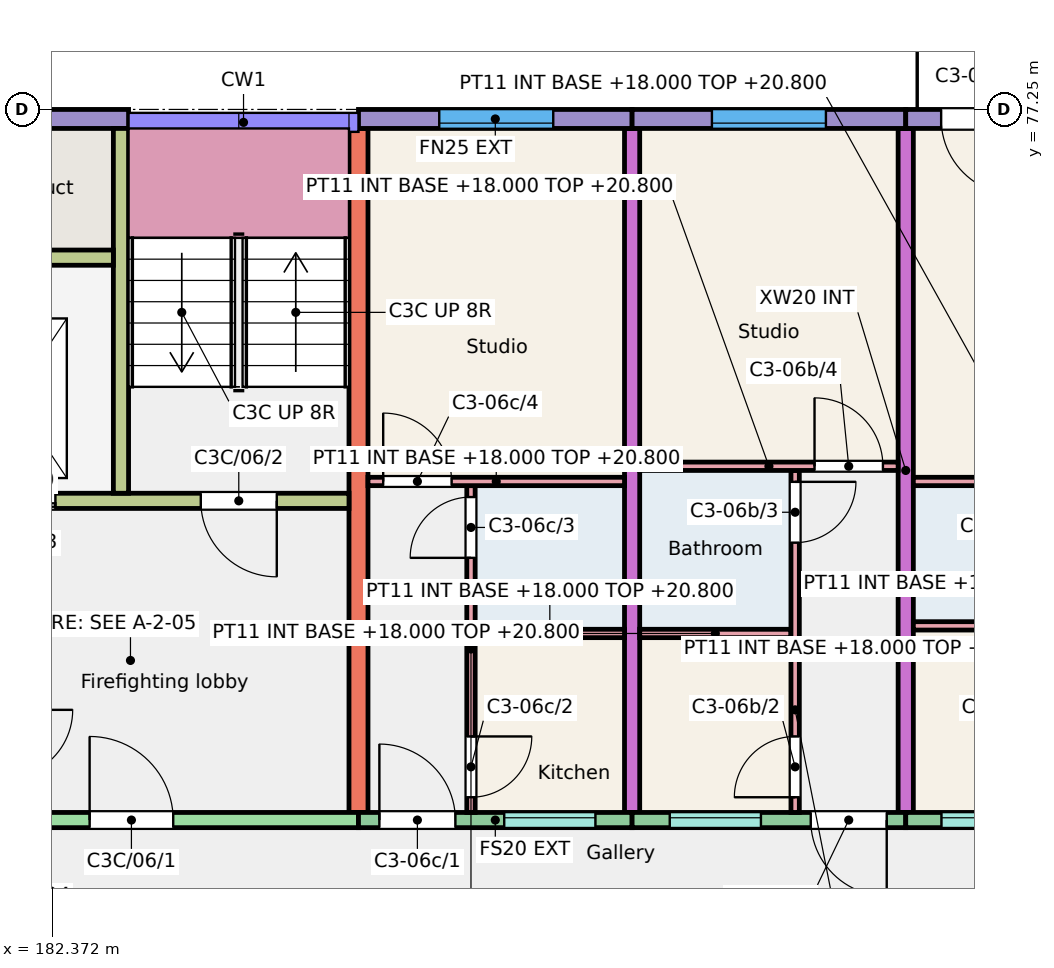
"""IFC4 building model, lengths in metres.
Left out: names, types, materials, properties, quantities, classifications, styles, units other than length and angle.
Written with IfcOpenShell. Run it as: python <this file> out.ifc"""

import sys

from ifc_helpers import new_model, si_unit, direction, frame, frame_2d, origin, place, context, subcontext, project, spatial, rectangle, extrude, element, fill, save


model = new_model("IFC4")
c1 = context("Model", 3, precision=1e-05, world=origin(), true_north=direction((0.0, 1.0)))
c2 = subcontext(c1, "Body", "Model", "MODEL_VIEW")
j1 = project(units=[si_unit("LENGTHUNIT", "METRE"), si_unit("PLANEANGLEUNIT", "RADIAN")], contexts=[c1])
p1 = place(None, origin())
s1 = spatial("IfcSite", under=j1, at=p1, CompositionType="ELEMENT")
p2 = place(p1, origin())
s2 = spatial("IfcBuilding", under=s1, at=p2, CompositionType="ELEMENT")
p3 = place(p2, frame((0.0, 0.0, 18.0)))
s3 = spatial("IfcBuildingStorey", under=s2, at=p3, CompositionType="ELEMENT", Elevation=18.0)
p4 = place(p3, frame((186.4, 68.0, 0.0), z_axis=(0.0, 0.0, 1.0), x_axis=(0.0, 1.0, 0.0)))
e1 = element("IfcWall", 1, at=p4, inside=s3, PredefinedType="SHEAR", context=c2, shape_type="SweptSolid", body=[
    extrude(rectangle(XDim=9.0, YDim=0.25, at=frame_2d((4.5, 0.0))), origin(), (0.0, 0.0, 1.0), 3.0),
])
for number, where, z_axis, x_axis in (
    (2, (190.0, 68.0, 0.0), (0.0, 0.0, 1.0), (0.0, 1.0, 0.0)),
    (3, (193.6, 68.0, 0.0), (0.0, 0.0, 1.0), (0.0, 1.0, 0.0)),
):
    element("IfcWall", number, at=place(p3, frame(where, z_axis=z_axis, x_axis=x_axis)), inside=s3, PredefinedType="SHEAR", context=c2, shape_type="SweptSolid", body=[
        extrude(rectangle(XDim=9.0, YDim=0.2, at=frame_2d((4.5, 0.0))), origin(), (0.0, 0.0, 1.0), 3.0),
    ])
p5 = place(p3, frame((180.4, 77.125, 0.0), z_axis=(0.0, 0.0, 1.0), x_axis=(1.0, 0.0, 0.0)))
e4 = element("IfcWall", 4, at=p5, inside=s3, PredefinedType="SOLIDWALL", context=c2, shape_type="SweptSolid", body=[
    extrude(rectangle(XDim=2.975, YDim=0.25, at=frame_2d((1.488, 0.0))), origin(), (0.0, 0.0, 1.0), 3.0),
])
p6 = place(p3, frame((180.55, 67.9, 0.0), z_axis=(0.0, 0.0, 1.0), x_axis=(1.0, 0.0, 0.0)))
e5 = element("IfcWall", 5, at=p6, inside=s3, PredefinedType="SHEAR", context=c2, shape_type="SweptSolid", body=[
    extrude(rectangle(XDim=5.85, YDim=0.2, at=frame_2d((2.925, 0.0))), origin(), (0.0, 0.0, 1.0), 3.0),
])
p7 = place(p6, frame((2.312, 0.0, 0.0)))
e6 = element("IfcOpeningElement", 6, at=p7, cuts=e5, PredefinedType="OPENING", context=c2, shape_type="SweptSolid", body=[
    extrude(rectangle(XDim=1.1, YDim=2.1, at=frame_2d((0.55, 1.05))), frame((0.0, 0.11, 0.0), z_axis=(0.0, -1.0, 0.0), x_axis=(1.0, 0.0, 0.0)), (0.0, 0.0, 1.0), 0.22),
])
p8 = place(p3, frame((180.55, 72.1, 0.0), z_axis=(0.0, 0.0, 1.0), x_axis=(1.0, 0.0, 0.0)))
e7 = element("IfcWall", 7, at=p8, inside=s3, PredefinedType="SHEAR", context=c2, shape_type="SweptSolid", body=[
    extrude(rectangle(XDim=5.725, YDim=0.2, at=frame_2d((2.862, 0.0))), origin(), (0.0, 0.0, 1.0), 3.0),
])
p9 = place(p8, frame((3.775, 0.0, 0.0)))
e8 = element("IfcOpeningElement", 8, at=p9, cuts=e7, PredefinedType="OPENING", context=c2, shape_type="SweptSolid", body=[
    extrude(rectangle(XDim=1.0, YDim=2.1, at=frame_2d((0.5, 1.05))), frame((0.0, 0.11, 0.0), z_axis=(0.0, -1.0, 0.0), x_axis=(1.0, 0.0, 0.0)), (0.0, 0.0, 1.0), 0.22),
])
p10 = place(p8, frame((0.762, 0.0, 0.0)))
e9 = element("IfcOpeningElement", 9, at=p10, cuts=e7, PredefinedType="OPENING", context=c2, shape_type="SweptSolid", body=[
    extrude(rectangle(XDim=1.1, YDim=2.1, at=frame_2d((0.55, 1.05))), frame((0.0, 0.11, 0.0), z_axis=(0.0, -1.0, 0.0), x_axis=(1.0, 0.0, 0.0)), (0.0, 0.0, 1.0), 0.22),
])
p11 = place(p3, frame((183.275, 72.2, 0.0), z_axis=(0.0, 0.0, 1.0), x_axis=(0.0, 1.0, 0.0)))
e10 = element("IfcWall", 10, at=p11, inside=s3, PredefinedType="SHEAR", context=c2, shape_type="SweptSolid", body=[
    extrude(rectangle(XDim=4.8, YDim=0.2, at=frame_2d((2.4, 0.0))), origin(), (0.0, 0.0, 1.0), 3.0),
])
p12 = place(p3, frame((180.55, 75.3, 0.0), z_axis=(0.0, 0.0, 1.0), x_axis=(1.0, 0.0, 0.0)))
e11 = element("IfcWall", 11, at=p12, inside=s3, PredefinedType="SHEAR", context=c2, shape_type="SweptSolid", body=[
    extrude(rectangle(XDim=2.625, YDim=0.2, at=frame_2d((1.312, 0.0))), origin(), (0.0, 0.0, 1.0), 3.0),
])
p13 = place(p3, frame((186.4, 77.125, 0.0), z_axis=(0.0, 0.0, 1.0), x_axis=(1.0, 0.0, 0.0)))
e12 = element("IfcWall", 12, at=p13, inside=s3, PredefinedType="SOLIDWALL", context=c2, shape_type="SweptSolid", body=[
    extrude(rectangle(XDim=3.6, YDim=0.25, at=frame_2d((1.8, 0.0))), origin(), (0.0, 0.0, 1.0), 3.0),
])
p14 = place(p13, frame((1.062, 0.0, 0.9)))
e13 = element("IfcOpeningElement", 13, at=p14, cuts=e12, PredefinedType="OPENING", context=c2, shape_type="SweptSolid", body=[
    extrude(rectangle(XDim=1.5, YDim=1.5, at=frame_2d((0.75, 0.75))), frame((0.0, 0.135, 0.0), z_axis=(0.0, -1.0, 0.0), x_axis=(1.0, 0.0, 0.0)), (0.0, 0.0, 1.0), 0.27),
])
p15 = place(p3, frame((186.4, 67.9, 0.0), z_axis=(0.0, 0.0, 1.0), x_axis=(1.0, 0.0, 0.0)))
e14 = element("IfcWall", 14, at=p15, inside=s3, PredefinedType="SOLIDWALL", context=c2, shape_type="SweptSolid", body=[
    extrude(rectangle(XDim=3.6, YDim=0.2, at=frame_2d((1.8, 0.0))), origin(), (0.0, 0.0, 1.0), 3.0),
])
p16 = place(p15, frame((1.917, 0.0, 1.1)))
e15 = element("IfcOpeningElement", 15, at=p16, cuts=e14, PredefinedType="OPENING", context=c2, shape_type="SweptSolid", body=[
    extrude(rectangle(XDim=1.2, YDim=1.3, at=frame_2d((0.6, 0.65))), frame((0.0, 0.11, 0.0), z_axis=(0.0, -1.0, 0.0), x_axis=(1.0, 0.0, 0.0)), (0.0, 0.0, 1.0), 0.22),
])
p17 = place(p15, frame((0.275, 0.0, 0.0)))
e16 = element("IfcOpeningElement", 16, at=p17, cuts=e14, PredefinedType="OPENING", context=c2, shape_type="SweptSolid", body=[
    extrude(rectangle(XDim=1.0, YDim=2.1, at=frame_2d((0.5, 1.05))), frame((0.0, 0.11, 0.0), z_axis=(0.0, -1.0, 0.0), x_axis=(1.0, 0.0, 0.0)), (0.0, 0.0, 1.0), 0.22),
])
p18 = place(p3, frame((190.0, 77.125, 0.0), z_axis=(0.0, 0.0, 1.0), x_axis=(1.0, 0.0, 0.0)))
e17 = element("IfcWall", 17, at=p18, inside=s3, PredefinedType="SOLIDWALL", context=c2, shape_type="SweptSolid", body=[
    extrude(rectangle(XDim=3.6, YDim=0.25, at=frame_2d((1.8, 0.0))), origin(), (0.0, 0.0, 1.0), 3.0),
])
p19 = place(p18, frame((1.05, 0.0, 0.9)))
e18 = element("IfcOpeningElement", 18, at=p19, cuts=e17, PredefinedType="OPENING", context=c2, shape_type="SweptSolid", body=[
    extrude(rectangle(XDim=1.5, YDim=1.5, at=frame_2d((0.75, 0.75))), frame((0.0, 0.135, 0.0), z_axis=(0.0, -1.0, 0.0), x_axis=(1.0, 0.0, 0.0)), (0.0, 0.0, 1.0), 0.27),
])
p20 = place(p3, frame((190.0, 67.9, 0.0), z_axis=(0.0, 0.0, 1.0), x_axis=(1.0, 0.0, 0.0)))
e19 = element("IfcWall", 19, at=p20, inside=s3, PredefinedType="SOLIDWALL", context=c2, shape_type="SweptSolid", body=[
    extrude(rectangle(XDim=3.6, YDim=0.2, at=frame_2d((1.8, 0.0))), origin(), (0.0, 0.0, 1.0), 3.0),
])
p21 = place(p20, frame((0.495, 0.0, 1.1)))
e20 = element("IfcOpeningElement", 20, at=p21, cuts=e19, PredefinedType="OPENING", context=c2, shape_type="SweptSolid", body=[
    extrude(rectangle(XDim=1.2, YDim=1.3, at=frame_2d((0.6, 0.65))), frame((0.0, 0.11, 0.0), z_axis=(0.0, -1.0, 0.0), x_axis=(1.0, 0.0, 0.0)), (0.0, 0.0, 1.0), 0.22),
])
p22 = place(p20, frame((2.35, 0.0, 0.0)))
e21 = element("IfcOpeningElement", 21, at=p22, cuts=e19, PredefinedType="OPENING", context=c2, shape_type="SweptSolid", body=[
    extrude(rectangle(XDim=1.0, YDim=2.1, at=frame_2d((0.5, 1.05))), frame((0.0, 0.11, 0.0), z_axis=(0.0, -1.0, 0.0), x_axis=(1.0, 0.0, 0.0)), (0.0, 0.0, 1.0), 0.22),
])
p23 = place(p3, frame((193.6, 77.125, 0.0), z_axis=(0.0, 0.0, 1.0), x_axis=(1.0, 0.0, 0.0)))
e22 = element("IfcWall", 22, at=p23, inside=s3, PredefinedType="SOLIDWALL", context=c2, shape_type="SweptSolid", body=[
    extrude(rectangle(XDim=3.6, YDim=0.25, at=frame_2d((1.8, 0.0))), origin(), (0.0, 0.0, 1.0), 3.0),
])
p24 = place(p23, frame((1.758, 0.0, 0.9)))
e23 = element("IfcOpeningElement", 23, at=p24, cuts=e22, PredefinedType="OPENING", context=c2, shape_type="SweptSolid", body=[
    extrude(rectangle(XDim=1.5, YDim=1.5, at=frame_2d((0.75, 0.75))), frame((0.0, 0.135, 0.0), z_axis=(0.0, -1.0, 0.0), x_axis=(1.0, 0.0, 0.0)), (0.0, 0.0, 1.0), 0.27),
])
p25 = place(p23, frame((0.466, 0.0, 0.0)))
e24 = element("IfcOpeningElement", 24, at=p25, cuts=e22, PredefinedType="OPENING", context=c2, shape_type="SweptSolid", body=[
    extrude(rectangle(XDim=1.0, YDim=2.1, at=frame_2d((0.5, 1.05))), frame((0.0, 0.135, 0.0), z_axis=(0.0, -1.0, 0.0), x_axis=(1.0, 0.0, 0.0)), (0.0, 0.0, 1.0), 0.27),
])
p26 = place(p3, frame((193.6, 67.9, 0.0), z_axis=(0.0, 0.0, 1.0), x_axis=(1.0, 0.0, 0.0)))
e25 = element("IfcWall", 25, at=p26, inside=s3, PredefinedType="SOLIDWALL", context=c2, shape_type="SweptSolid", body=[
    extrude(rectangle(XDim=3.45, YDim=0.2, at=frame_2d((1.725, 0.0))), origin(), (0.0, 0.0, 1.0), 3.0),
])
p27 = place(p26, frame((0.47, 0.0, 1.1)))
e26 = element("IfcOpeningElement", 26, at=p27, cuts=e25, PredefinedType="OPENING", context=c2, shape_type="SweptSolid", body=[
    extrude(rectangle(XDim=1.2, YDim=1.3, at=frame_2d((0.6, 0.65))), frame((0.0, 0.11, 0.0), z_axis=(0.0, -1.0, 0.0), x_axis=(1.0, 0.0, 0.0)), (0.0, 0.0, 1.0), 0.22),
])
p28 = place(p26, frame((2.3, 0.0, 0.0)))
e27 = element("IfcOpeningElement", 27, at=p28, cuts=e25, PredefinedType="OPENING", context=c2, shape_type="SweptSolid", body=[
    extrude(rectangle(XDim=1.0, YDim=2.1, at=frame_2d((0.5, 1.05))), frame((0.0, 0.11, 0.0), z_axis=(0.0, -1.0, 0.0), x_axis=(1.0, 0.0, 0.0)), (0.0, 0.0, 1.0), 0.22),
])
p29 = place(p3, frame((193.7, 70.455, 0.0), z_axis=(0.0, 0.0, 1.0), x_axis=(1.0, 0.0, 0.0)))
e28 = element("IfcWall", 28, at=p29, inside=s3, PredefinedType="PARTITIONING", context=c2, shape_type="SweptSolid", body=[
    extrude(rectangle(XDim=1.94, YDim=0.11, at=frame_2d((0.97, 0.0))), origin(), (0.0, 0.0, 1.0), 2.8),
])
p30 = place(p3, frame((193.7, 72.355, 0.0), z_axis=(0.0, 0.0, 1.0), x_axis=(1.0, 0.0, 0.0)))
e29 = element("IfcWall", 29, at=p30, inside=s3, PredefinedType="PARTITIONING", context=c2, shape_type="SweptSolid", body=[
    extrude(rectangle(XDim=3.35, YDim=0.11, at=frame_2d((1.675, 0.0))), origin(), (0.0, 0.0, 1.0), 2.8),
])
p31 = place(p30, frame((2.25, 0.0, 0.0)))
e30 = element("IfcOpeningElement", 30, at=p31, cuts=e29, PredefinedType="OPENING", context=c2, shape_type="SweptSolid", body=[
    extrude(rectangle(XDim=0.9, YDim=2.1, at=frame_2d((0.45, 1.05))), frame((0.0, 0.065, 0.0), z_axis=(0.0, -1.0, 0.0), x_axis=(1.0, 0.0, 0.0)), (0.0, 0.0, 1.0), 0.13),
])
p32 = place(p3, frame((190.1, 70.355, 0.0), z_axis=(0.0, 0.0, 1.0), x_axis=(1.0, 0.0, 0.0)))
e31 = element("IfcWall", 31, at=p32, inside=s3, PredefinedType="PARTITIONING", context=c2, shape_type="SweptSolid", body=[
    extrude(rectangle(XDim=1.99, YDim=0.11, at=frame_2d((0.995, 0.0))), origin(), (0.0, 0.0, 1.0), 2.8),
])
p33 = place(p3, frame((192.145, 68.0, 0.0), z_axis=(0.0, 0.0, 1.0), x_axis=(0.0, 1.0, 0.0)))
e32 = element("IfcWall", 32, at=p33, inside=s3, PredefinedType="PARTITIONING", context=c2, shape_type="SweptSolid", body=[
    extrude(rectangle(XDim=4.5, YDim=0.11, at=frame_2d((2.25, 0.0))), origin(), (0.0, 0.0, 1.0), 2.8),
])
p34 = place(p33, frame((0.2, 0.0, 0.0)))
e33 = element("IfcOpeningElement", 33, at=p34, cuts=e32, PredefinedType="OPENING", context=c2, shape_type="SweptSolid", body=[
    extrude(rectangle(XDim=0.8, YDim=2.1, at=frame_2d((0.4, 1.05))), frame((0.0, 0.065, 0.0), z_axis=(0.0, -1.0, 0.0), x_axis=(1.0, 0.0, 0.0)), (0.0, 0.0, 1.0), 0.13),
])
p35 = place(p33, frame((3.55, 0.0, 0.0)))
e34 = element("IfcOpeningElement", 34, at=p35, cuts=e32, PredefinedType="OPENING", context=c2, shape_type="SweptSolid", body=[
    extrude(rectangle(XDim=0.8, YDim=2.1, at=frame_2d((0.4, 1.05))), frame((0.0, 0.065, 0.0), z_axis=(0.0, -1.0, 0.0), x_axis=(1.0, 0.0, 0.0)), (0.0, 0.0, 1.0), 0.13),
])
p36 = place(p3, frame((190.1, 72.555, 0.0), z_axis=(0.0, 0.0, 1.0), x_axis=(1.0, 0.0, 0.0)))
e35 = element("IfcWall", 35, at=p36, inside=s3, PredefinedType="PARTITIONING", context=c2, shape_type="SweptSolid", body=[
    extrude(rectangle(XDim=3.4, YDim=0.11, at=frame_2d((1.7, 0.0))), origin(), (0.0, 0.0, 1.0), 2.8),
])
p37 = place(p36, frame((2.3, 0.0, 0.0)))
e36 = element("IfcOpeningElement", 36, at=p37, cuts=e35, PredefinedType="OPENING", context=c2, shape_type="SweptSolid", body=[
    extrude(rectangle(XDim=0.9, YDim=2.1, at=frame_2d((0.45, 1.05))), frame((0.0, 0.065, 0.0), z_axis=(0.0, -1.0, 0.0), x_axis=(1.0, 0.0, 0.0)), (0.0, 0.0, 1.0), 0.13),
])
p38 = place(p3, frame((187.88, 68.0, 0.0), z_axis=(0.0, 0.0, 1.0), x_axis=(0.0, 1.0, 0.0)))
e37 = element("IfcWall", 37, at=p38, inside=s3, PredefinedType="PARTITIONING", context=c2, shape_type="SweptSolid", body=[
    extrude(rectangle(XDim=4.3, YDim=0.11, at=frame_2d((2.15, 0.0))), origin(), (0.0, 0.0, 1.0), 2.8),
])
p39 = place(p38, frame((0.2, 0.0, 0.0)))
e38 = element("IfcOpeningElement", 38, at=p39, cuts=e37, PredefinedType="OPENING", context=c2, shape_type="SweptSolid", body=[
    extrude(rectangle(XDim=0.8, YDim=2.1, at=frame_2d((0.4, 1.05))), frame((0.0, 0.065, 0.0), z_axis=(0.0, -1.0, 0.0), x_axis=(1.0, 0.0, 0.0)), (0.0, 0.0, 1.0), 0.13),
])
p40 = place(p38, frame((3.35, 0.0, 0.0)))
e39 = element("IfcOpeningElement", 39, at=p40, cuts=e37, PredefinedType="OPENING", context=c2, shape_type="SweptSolid", body=[
    extrude(rectangle(XDim=0.8, YDim=2.1, at=frame_2d((0.4, 1.05))), frame((0.0, 0.065, 0.0), z_axis=(0.0, -1.0, 0.0), x_axis=(1.0, 0.0, 0.0)), (0.0, 0.0, 1.0), 0.13),
])
p41 = place(p3, frame((187.935, 70.355, 0.0), z_axis=(0.0, 0.0, 1.0), x_axis=(1.0, 0.0, 0.0)))
e40 = element("IfcWall", 40, at=p41, inside=s3, PredefinedType="PARTITIONING", context=c2, shape_type="SweptSolid", body=[
    extrude(rectangle(XDim=1.965, YDim=0.11, at=frame_2d((0.982, 0.0))), origin(), (0.0, 0.0, 1.0), 2.8),
])
p42 = place(p3, frame((186.525, 72.355, 0.0), z_axis=(0.0, 0.0, 1.0), x_axis=(1.0, 0.0, 0.0)))
e41 = element("IfcWall", 41, at=p42, inside=s3, PredefinedType="PARTITIONING", context=c2, shape_type="SweptSolid", body=[
    extrude(rectangle(XDim=3.375, YDim=0.11, at=frame_2d((1.688, 0.0))), origin(), (0.0, 0.0, 1.0), 2.8),
])
p43 = place(p42, frame((0.2, 0.0, 0.0)))
e42 = element("IfcOpeningElement", 42, at=p43, cuts=e41, PredefinedType="OPENING", context=c2, shape_type="SweptSolid", body=[
    extrude(rectangle(XDim=0.9, YDim=2.1, at=frame_2d((0.45, 1.05))), frame((0.0, 0.065, 0.0), z_axis=(0.0, -1.0, 0.0), x_axis=(1.0, 0.0, 0.0)), (0.0, 0.0, 1.0), 0.13),
])
p44 = place(p27, origin())
e43 = element("IfcWindow", 43, at=p44, inside=s3, PartitioningType="SINGLE_PANEL", PredefinedType="WINDOW", context=c2, shape_type="SweptSolid", body=[
    extrude(rectangle(XDim=1.2, YDim=1.3, at=frame_2d((0.6, 0.65))), frame((0.0, 0.06, 0.0), z_axis=(0.0, -1.0, 0.0), x_axis=(1.0, 0.0, 0.0)), (0.0, 0.0, 1.0), 0.06),
])
fill(e26, e43)
p45 = place(p21, origin())
e44 = element("IfcWindow", 44, at=p45, inside=s3, PartitioningType="SINGLE_PANEL", PredefinedType="WINDOW", context=c2, shape_type="SweptSolid", body=[
    extrude(rectangle(XDim=1.2, YDim=1.3, at=frame_2d((0.6, 0.65))), frame((0.0, 0.06, 0.0), z_axis=(0.0, -1.0, 0.0), x_axis=(1.0, 0.0, 0.0)), (0.0, 0.0, 1.0), 0.06),
])
fill(e20, e44)
p46 = place(p19, origin())
e45 = element("IfcWindow", 45, at=p46, inside=s3, PartitioningType="SINGLE_PANEL", PredefinedType="WINDOW", context=c2, shape_type="SweptSolid", body=[
    extrude(rectangle(XDim=1.5, YDim=1.5, at=frame_2d((0.75, 0.75))), frame((0.0, -0.025, 0.0), z_axis=(0.0, -1.0, 0.0), x_axis=(1.0, 0.0, 0.0)), (0.0, 0.0, 1.0), 0.06),
])
fill(e18, e45)
p47 = place(p16, origin())
e46 = element("IfcWindow", 46, at=p47, inside=s3, PartitioningType="SINGLE_PANEL", PredefinedType="WINDOW", context=c2, shape_type="SweptSolid", body=[
    extrude(rectangle(XDim=1.2, YDim=1.3, at=frame_2d((0.6, 0.65))), frame((0.0, 0.06, 0.0), z_axis=(0.0, -1.0, 0.0), x_axis=(1.0, 0.0, 0.0)), (0.0, 0.0, 1.0), 0.06),
])
fill(e15, e46)
p48 = place(p14, origin())
e47 = element("IfcWindow", 47, at=p48, inside=s3, PartitioningType="SINGLE_PANEL", PredefinedType="WINDOW", context=c2, shape_type="SweptSolid", body=[
    extrude(rectangle(XDim=1.5, YDim=1.5, at=frame_2d((0.75, 0.75))), frame((0.0, -0.025, 0.0), z_axis=(0.0, -1.0, 0.0), x_axis=(1.0, 0.0, 0.0)), (0.0, 0.0, 1.0), 0.06),
])
fill(e13, e47)
p49 = place(p25, origin())
e48 = element("IfcDoor", 48, at=p49, inside=s3, OperationType="SINGLE_SWING_RIGHT", PredefinedType="DOOR", context=c2, shape_type="SweptSolid", body=[
    extrude(rectangle(XDim=1.0, YDim=2.1, at=frame_2d((0.5, 1.05))), frame((0.0, 0.025, 0.0), z_axis=(0.0, -1.0, 0.0), x_axis=(1.0, 0.0, 0.0)), (0.0, 0.0, 1.0), 0.05),
])
fill(e24, e48)
p50 = place(p22, origin())
e49 = element("IfcDoor", 49, at=p50, inside=s3, OperationType="SINGLE_SWING_RIGHT", PredefinedType="DOOR", context=c2, shape_type="SweptSolid", body=[
    extrude(rectangle(XDim=1.0, YDim=2.1, at=frame_2d((0.5, 1.05))), frame((0.0, 0.025, 0.0), z_axis=(0.0, -1.0, 0.0), x_axis=(1.0, 0.0, 0.0)), (0.0, 0.0, 1.0), 0.05),
])
fill(e21, e49)
p51 = place(p34, origin())
e50 = element("IfcDoor", 50, at=p51, inside=s3, OperationType="SINGLE_SWING_LEFT", PredefinedType="DOOR", context=c2, shape_type="SweptSolid", body=[
    extrude(rectangle(XDim=0.8, YDim=2.1, at=frame_2d((0.4, 1.05))), frame((0.0, 0.025, 0.0), z_axis=(0.0, -1.0, 0.0), x_axis=(1.0, 0.0, 0.0)), (0.0, 0.0, 1.0), 0.05),
])
fill(e33, e50)
p52 = place(p35, origin())
e51 = element("IfcDoor", 51, at=p52, inside=s3, OperationType="SINGLE_SWING_RIGHT", PredefinedType="DOOR", context=c2, shape_type="SweptSolid", body=[
    extrude(rectangle(XDim=0.8, YDim=2.1, at=frame_2d((0.4, 1.05))), frame((0.0, 0.025, 0.0), z_axis=(0.0, -1.0, 0.0), x_axis=(1.0, 0.0, 0.0)), (0.0, 0.0, 1.0), 0.05),
])
fill(e34, e51)
p53 = place(p37, origin())
e52 = element("IfcDoor", 52, at=p53, inside=s3, OperationType="SINGLE_SWING_LEFT", PredefinedType="DOOR", context=c2, shape_type="SweptSolid", body=[
    extrude(rectangle(XDim=0.9, YDim=2.1, at=frame_2d((0.45, 1.05))), frame((0.0, 0.025, 0.0), z_axis=(0.0, -1.0, 0.0), x_axis=(1.0, 0.0, 0.0)), (0.0, 0.0, 1.0), 0.05),
])
fill(e36, e52)
p54 = place(p17, origin())
e53 = element("IfcDoor", 53, at=p54, inside=s3, OperationType="SINGLE_SWING_LEFT", PredefinedType="DOOR", context=c2, shape_type="SweptSolid", body=[
    extrude(rectangle(XDim=1.0, YDim=2.1, at=frame_2d((0.5, 1.05))), frame((0.0, 0.025, 0.0), z_axis=(0.0, -1.0, 0.0), x_axis=(1.0, 0.0, 0.0)), (0.0, 0.0, 1.0), 0.05),
])
fill(e16, e53)
p55 = place(p39, origin())
e54 = element("IfcDoor", 54, at=p55, inside=s3, OperationType="SINGLE_SWING_RIGHT", PredefinedType="DOOR", context=c2, shape_type="SweptSolid", body=[
    extrude(rectangle(XDim=0.8, YDim=2.1, at=frame_2d((0.4, 1.05))), frame((0.0, 0.025, 0.0), z_axis=(0.0, -1.0, 0.0), x_axis=(1.0, 0.0, 0.0)), (0.0, 0.0, 1.0), 0.05),
])
fill(e38, e54)
p56 = place(p40, origin())
e55 = element("IfcDoor", 55, at=p56, inside=s3, OperationType="SINGLE_SWING_LEFT", PredefinedType="DOOR", context=c2, shape_type="SweptSolid", body=[
    extrude(rectangle(XDim=0.8, YDim=2.1, at=frame_2d((0.4, 1.05))), frame((0.0, 0.025, 0.0), z_axis=(0.0, -1.0, 0.0), x_axis=(1.0, 0.0, 0.0)), (0.0, 0.0, 1.0), 0.05),
])
fill(e39, e55)
p57 = place(p43, origin())
e56 = element("IfcDoor", 56, at=p57, inside=s3, OperationType="SINGLE_SWING_LEFT", PredefinedType="DOOR", context=c2, shape_type="SweptSolid", body=[
    extrude(rectangle(XDim=0.9, YDim=2.1, at=frame_2d((0.45, 1.05))), frame((0.0, 0.025, 0.0), z_axis=(0.0, -1.0, 0.0), x_axis=(1.0, 0.0, 0.0)), (0.0, 0.0, 1.0), 0.05),
])
fill(e42, e56)
p58 = place(p7, origin())
e57 = element("IfcDoor", 57, at=p58, inside=s3, OperationType="SINGLE_SWING_LEFT", PredefinedType="DOOR", context=c2, shape_type="SweptSolid", body=[
    extrude(rectangle(XDim=1.1, YDim=2.1, at=frame_2d((0.55, 1.05))), frame((0.0, 0.025, 0.0), z_axis=(0.0, -1.0, 0.0), x_axis=(1.0, 0.0, 0.0)), (0.0, 0.0, 1.0), 0.05),
])
fill(e6, e57)
p59 = place(p9, origin())
e58 = element("IfcDoor", 58, at=p59, inside=s3, OperationType="SINGLE_SWING_RIGHT", PredefinedType="DOOR", context=c2, shape_type="SweptSolid", body=[
    extrude(rectangle(XDim=1.0, YDim=2.1, at=frame_2d((0.5, 1.05))), frame((0.0, 0.025, 0.0), z_axis=(0.0, -1.0, 0.0), x_axis=(1.0, 0.0, 0.0)), (0.0, 0.0, 1.0), 0.05),
])
fill(e8, e58)
p60 = place(p10, origin())
e59 = element("IfcDoor", 59, at=p60, inside=s3, OperationType="DOUBLE_DOOR_SLIDING", PredefinedType="DOOR", context=c2, shape_type="SweptSolid", body=[
    extrude(rectangle(XDim=1.1, YDim=2.1, at=frame_2d((0.55, 1.05))), frame((0.0, 0.025, 0.0), z_axis=(0.0, -1.0, 0.0), x_axis=(1.0, 0.0, 0.0)), (0.0, 0.0, 1.0), 0.05),
])
fill(e9, e59)
save(model, sys.argv[1])
